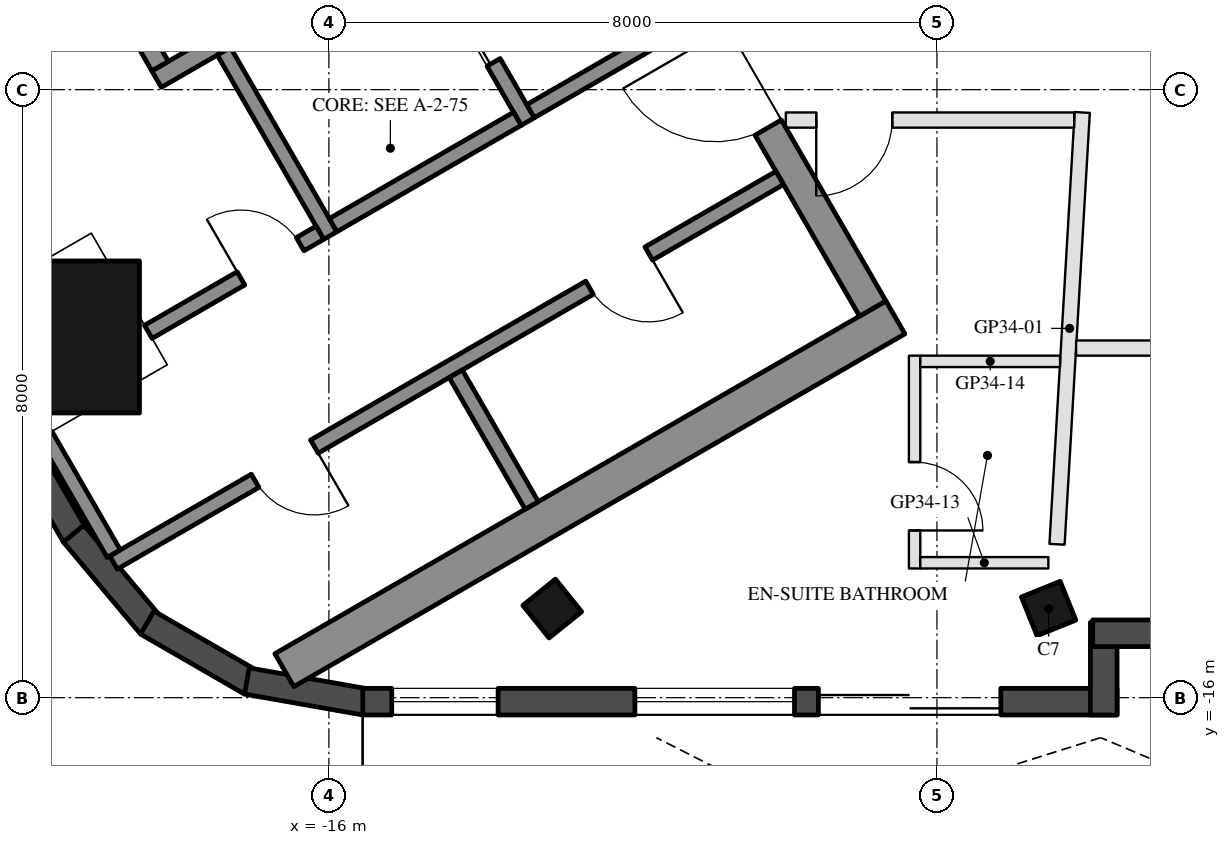
"""IFC4 building model, lengths in metres.
Left out: names, types, materials, properties, quantities, classifications, styles, units other than length and angle.
Written with IfcOpenShell. Run it as: python <this file> out.ifc"""

import sys

from ifc_helpers import new_model, si_unit, direction, frame, frame_2d, origin, origin_2d, place, context, subcontext, project, spatial, rectangle, hollow_rectangle, extrude, boolean, halfspace, element, fill, save


model = new_model("IFC4")
c1 = context("Model", 3, precision=1e-05, world=origin(), true_north=direction((0.0, 1.0)))
c2 = subcontext(c1, "Body", "Model", "MODEL_VIEW")
j1 = project(units=[si_unit("LENGTHUNIT", "METRE"), si_unit("PLANEANGLEUNIT", "RADIAN")], contexts=[c1])
p1 = place(None, origin())
s1 = spatial("IfcSite", under=j1, at=p1, CompositionType="ELEMENT")
p2 = place(p1, origin())
s2 = spatial("IfcBuilding", under=s1, at=p2, CompositionType="ELEMENT")
p3 = place(p2, frame((0.0, 0.0, 320.7)))
s3 = spatial("IfcBuildingStorey", under=s2, at=p3, CompositionType="ELEMENT", Elevation=320.7)
p4 = place(p3, frame((-13.061, -14.827, 0.0), z_axis=(0.121007284992, 0.150336498529, 0.981201393287), x_axis=(-0.992609775631, 0.009249858451, 0.120996997646)))
e1 = element("IfcColumn", 1, at=p4, inside=s3, PredefinedType="COLUMN", context=c2, shape_type="SweptSolid", body=[
    boolean("DIFFERENCE", boolean("DIFFERENCE", extrude(hollow_rectangle(XDim=0.55, YDim=0.55, WallThickness=0.025, at=origin_2d()), origin(), (0.0, 0.0, 1.0), 3.771), halfspace(frame((0.0, 0.0, 0.04), z_axis=(0.0, 0.0, 1.0), x_axis=(1.0, 0.0, 0.0)), True)), halfspace(frame((0.0, 0.0, 3.731), z_axis=(0.0, 0.0, 1.0), x_axis=(1.0, 0.0, 0.0)), False)),
])
p5 = place(p3, frame((-6.531, -14.827, 0.0), z_axis=(0.060871062735, 0.151168564354, 0.986632038235), x_axis=(-0.998135304591, 0.004721094283, 0.0608574153)))
e2 = element("IfcColumn", 2, at=p5, inside=s3, PredefinedType="COLUMN", context=c2, shape_type="SweptSolid", body=[
    boolean("DIFFERENCE", boolean("DIFFERENCE", extrude(hollow_rectangle(XDim=0.55, YDim=0.55, WallThickness=0.025, at=origin_2d()), origin(), (0.0, 0.0, 1.0), 3.75), halfspace(frame((0.0, 0.0, 0.034), z_axis=(0.0, 0.0, 1.0), x_axis=(1.0, 0.0, 0.0)), True)), halfspace(frame((0.0, 0.0, 3.716), z_axis=(0.0, 0.0, 1.0), x_axis=(1.0, 0.0, 0.0)), False)),
])
p6 = place(p3, frame((-19.492, -11.254, 0.0), z_axis=(0.190406849863, 0.109944185114, 0.975529347424), x_axis=(-0.500043453909, 0.866000314205, 0.0)))
e3 = element("IfcColumn", 3, at=p6, inside=s3, PredefinedType="COLUMN", context=c2, shape_type="SweptSolid", body=[
    boolean("DIFFERENCE", boolean("DIFFERENCE", extrude(hollow_rectangle(XDim=2.0, YDim=2.0, WallThickness=0.05, at=origin_2d()), origin(), (0.0, 0.0, 1.0), 3.793), halfspace(frame((0.0, 0.0, 0.113), z_axis=(0.0, 0.0, 1.0), x_axis=(1.0, 0.0, 0.0)), True)), halfspace(frame((0.0, 0.0, 3.679), z_axis=(0.0, 0.0, 1.0), x_axis=(1.0, 0.0, 0.0)), False)),
])
p7 = place(p3, frame((-21.679, -9.816, 0.0), z_axis=(0.0, 0.0, 1.0), x_axis=(0.500023656998, -0.86601174498, 0.0)))
e4 = element("IfcWall", 4, at=p7, inside=s3, PredefinedType="SOLIDWALL", context=c2, shape_type="SweptSolid", body=[
    extrude(rectangle(XDim=4.677, YDim=0.35, at=frame_2d((2.339, 0.0))), origin(), (0.0, 0.0, 1.0), 3.55),
])
for number, where, z_axis, x_axis in (
    (5, (-19.358, -13.842, 0.0), (0.0, 0.0, 1.0), (0.643, -0.766, 0.0)),
    (6, (-18.389, -15.012, 0.0), (0.0, 0.0, 1.0), (0.866, -0.5, 0.0)),
    (7, (-17.079, -15.781, 0.0), (0.0, 0.0, 1.0), (0.985, -0.174, 0.0)),
):
    element("IfcWall", number, at=place(p3, frame(where, z_axis=z_axis, x_axis=x_axis)), inside=s3, PredefinedType="SOLIDWALL", context=c2, shape_type="SweptSolid", body=[
        extrude(rectangle(XDim=1.579, YDim=0.35, at=frame_2d((0.79, 0.0))), origin(), (0.0, 0.0, 1.0), 3.55),
    ])
p8 = place(p3, frame((-15.554, -16.052, 0.0), z_axis=(0.0, 0.0, 1.0), x_axis=(1.0, 0.0, 0.0)))
e8 = element("IfcWall", 8, at=p8, inside=s3, PredefinedType="SOLIDWALL", context=c2, shape_type="SweptSolid", body=[
    extrude(rectangle(XDim=9.924, YDim=0.35, at=frame_2d((4.962, 0.0))), origin(), (0.0, 0.0, 1.0), 3.55),
])
p9 = place(p8, frame((0.381, 0.0, 0.3)))
e9 = element("IfcOpeningElement", 9, at=p9, cuts=e8, PredefinedType="OPENING", context=c2, shape_type="SweptSolid", body=[
    extrude(rectangle(XDim=1.4, YDim=2.65, at=frame_2d((0.7, 1.325))), frame((0.0, 0.185, 0.0), z_axis=(0.0, -1.0, 0.0), x_axis=(1.0, 0.0, 0.0)), (0.0, 0.0, 1.0), 0.37),
])
p10 = place(p8, frame((5.995, 0.0, 0.0)))
e10 = element("IfcOpeningElement", 10, at=p10, cuts=e8, PredefinedType="OPENING", context=c2, shape_type="SweptSolid", body=[
    extrude(rectangle(XDim=2.4, YDim=2.4, at=frame_2d((1.2, 1.2))), frame((0.0, 0.185, 0.0), z_axis=(0.0, -1.0, 0.0), x_axis=(1.0, 0.0, 0.0)), (0.0, 0.0, 1.0), 0.37),
])
p11 = place(p8, frame((3.58, 0.0, 0.3)))
e11 = element("IfcOpeningElement", 11, at=p11, cuts=e8, PredefinedType="OPENING", context=c2, shape_type="SweptSolid", body=[
    extrude(rectangle(XDim=2.1, YDim=2.65, at=frame_2d((1.05, 1.325))), frame((0.0, 0.185, 0.0), z_axis=(0.0, -1.0, 0.0), x_axis=(1.0, 0.0, 0.0)), (0.0, 0.0, 1.0), 0.37),
])
p12 = place(p3, frame((-5.806, -16.228, 0.0), z_axis=(0.0, 0.0, 1.0), x_axis=(0.0, 1.0, 0.0)))
e12 = element("IfcWall", 12, at=p12, inside=s3, PredefinedType="SOLIDWALL", context=c2, shape_type="SweptSolid", body=[
    extrude(rectangle(XDim=1.22, YDim=0.35, at=frame_2d((0.61, 0.0))), origin(), (0.0, 0.0, 1.0), 3.55),
])
p13 = place(p3, frame((-5.951, -15.153, 0.0), z_axis=(0.0, 0.0, 1.0), x_axis=(1.0, 0.0, 0.0)))
e13 = element("IfcWall", 13, at=p13, inside=s3, PredefinedType="SOLIDWALL", context=c2, shape_type="SweptSolid", body=[
    extrude(rectangle(XDim=5.371, YDim=0.35, at=frame_2d((2.685, 0.0))), origin(), (0.0, 0.0, 1.0), 3.55),
])
p14 = place(p13, frame((1.236, 0.0, 0.0)))
e14 = element("IfcOpeningElement", 14, at=p14, cuts=e13, PredefinedType="OPENING", context=c2, shape_type="SweptSolid", body=[
    extrude(rectangle(XDim=1.8, YDim=2.4, at=frame_2d((0.9, 1.2))), frame((0.0, 0.185, 0.0), z_axis=(0.0, -1.0, 0.0), x_axis=(1.0, 0.0, 0.0)), (0.0, 0.0, 1.0), 0.37),
])
p15 = place(p3, frame((-8.547, -10.997, 0.0), z_axis=(0.0, 0.0, 1.0), x_axis=(-0.866025286072, -0.500000203884, 0.0)))
e15 = element("IfcWall", 15, at=p15, inside=s3, PredefinedType="SHEAR", context=c2, shape_type="SweptSolid", body=[
    extrude(rectangle(XDim=9.283, YDim=0.5, at=frame_2d((4.641, 0.0))), origin(), (0.0, 0.0, 1.0), 3.5),
])
p16 = place(p3, frame((-13.845, -2.22, 0.0), z_axis=(0.0, 0.0, 1.0), x_axis=(0.500004234368, -0.866022959057, 0.0)))
e16 = element("IfcWall", 16, at=p16, inside=s3, PredefinedType="SHEAR", context=c2, shape_type="SweptSolid", body=[
    extrude(rectangle(XDim=10.0, YDim=0.4, at=frame_2d((5.0, 0.0))), origin(), (0.0, 0.0, 1.0), 3.5),
])
p17 = place(p16, frame((3.55, 0.0, 0.0)))
e17 = element("IfcOpeningElement", 17, at=p17, cuts=e16, PredefinedType="OPENING", context=c2, shape_type="SweptSolid", body=[
    extrude(rectangle(XDim=1.1, YDim=2.1, at=frame_2d((0.55, 1.05))), frame((0.0, 0.21, 0.0), z_axis=(0.0, -1.0, 0.0), x_axis=(1.0, 0.0, 0.0)), (0.0, 0.0, 1.0), 0.42),
])
p18 = place(p16, frame((5.85, 0.0, 0.0)))
e18 = element("IfcOpeningElement", 18, at=p18, cuts=e16, PredefinedType="OPENING", context=c2, shape_type="SweptSolid", body=[
    extrude(rectangle(XDim=1.4, YDim=2.1, at=frame_2d((0.7, 1.05))), frame((0.0, 0.21, 0.0), z_axis=(0.0, -1.0, 0.0), x_axis=(1.0, 0.0, 0.0)), (0.0, 0.0, 1.0), 0.42),
])
p19 = place(p3, frame((-12.681, -4.636, 0.0), z_axis=(0.0, 0.0, 1.0), x_axis=(-0.866021702275, -0.500006411147, 0.0)))
e19 = element("IfcWall", 19, at=p19, inside=s3, PredefinedType="SHEAR", context=c2, shape_type="SweptSolid", body=[
    extrude(rectangle(XDim=6.45, YDim=0.25, at=frame_2d((3.225, 0.0))), origin(), (0.0, 0.0, 1.0), 3.5),
])
p20 = place(p19, frame((0.3, 0.0, 0.0)))
e20 = element("IfcOpeningElement", 20, at=p20, cuts=e19, PredefinedType="OPENING", context=c2, shape_type="SweptSolid", body=[
    extrude(rectangle(XDim=1.0, YDim=2.1, at=frame_2d((0.5, 1.05))), frame((0.0, 0.135, 0.0), z_axis=(0.0, -1.0, 0.0), x_axis=(1.0, 0.0, 0.0)), (0.0, 0.0, 1.0), 0.27),
])
p21 = place(p3, frame((-19.496, -5.482, 0.0), z_axis=(0.0, 0.0, 1.0), x_axis=(0.499990435942, -0.866030925526, 0.0)))
e21 = element("IfcWall", 21, at=p21, inside=s3, PredefinedType="SHEAR", context=c2, shape_type="SweptSolid", body=[
    extrude(rectangle(XDim=2.55, YDim=0.25, at=frame_2d((1.275, 0.0))), origin(), (0.0, 0.0, 1.0), 3.5),
])
p22 = place(p3, frame((-17.381, -7.495, 0.0), z_axis=(0.0, 0.0, 1.0), x_axis=(0.500011755427, -0.866018616679, 0.0)))
e22 = element("IfcWall", 22, at=p22, inside=s3, PredefinedType="SHEAR", context=c2, shape_type="SweptSolid", body=[
    extrude(rectangle(XDim=2.8, YDim=0.2, at=frame_2d((1.4, 0.0))), origin(), (0.0, 0.0, 1.0), 3.5),
])
p23 = place(p3, frame((-14.783, -5.995, 0.0), z_axis=(0.0, 0.0, 1.0), x_axis=(0.49994636267, -0.866056369097, 0.0)))
e23 = element("IfcWall", 23, at=p23, inside=s3, PredefinedType="SHEAR", context=c2, shape_type="SweptSolid", body=[
    extrude(rectangle(XDim=2.8, YDim=0.2, at=frame_2d((1.4, 0.0))), origin(), (0.0, 0.0, 1.0), 3.5),
])
p24 = place(p23, frame((0.7, 0.0, 0.0)))
e24 = element("IfcOpeningElement", 24, at=p24, cuts=e23, PredefinedType="OPENING", context=c2, shape_type="SweptSolid", body=[
    extrude(rectangle(XDim=1.2, YDim=2.1, at=frame_2d((0.6, 1.05))), frame((0.0, 0.11, 0.0), z_axis=(0.0, -1.0, 0.0), x_axis=(1.0, 0.0, 0.0)), (0.0, 0.0, 1.0), 0.22),
])
p25 = place(p3, frame((-13.52, -8.383, 0.0), z_axis=(0.0, 0.0, 1.0), x_axis=(-0.866034573852, -0.49998411664, 0.0)))
e25 = element("IfcWall", 25, at=p25, inside=s3, PredefinedType="SHEAR", context=c2, shape_type="SweptSolid", body=[
    extrude(rectangle(XDim=2.8, YDim=0.2, at=frame_2d((1.4, 0.0))), origin(), (0.0, 0.0, 1.0), 3.5),
])
p26 = place(p3, frame((-11.268, -7.083, 0.0), z_axis=(0.0, 0.0, 1.0), x_axis=(-0.866050077142, -0.499957262057, 0.0)))
e26 = element("IfcWall", 26, at=p26, inside=s3, PredefinedType="SHEAR", context=c2, shape_type="SweptSolid", body=[
    extrude(rectangle(XDim=2.4, YDim=0.2, at=frame_2d((1.2, 0.0))), origin(), (0.0, 0.0, 1.0), 3.5),
])
p27 = place(p3, frame((-10.068, -9.162, 0.0), z_axis=(0.0, 0.0, 1.0), x_axis=(-0.866030125237, -0.499991822116, 0.0)))
e27 = element("IfcWall", 27, at=p27, inside=s3, PredefinedType="SHEAR", context=c2, shape_type="SweptSolid", body=[
    extrude(rectangle(XDim=10.121, YDim=0.2, at=frame_2d((5.061, 0.0))), origin(), (0.0, 0.0, 1.0), 3.5),
])
p28 = place(p27, frame((1.99, 0.0, 0.0)))
e28 = element("IfcOpeningElement", 28, at=p28, cuts=e27, PredefinedType="OPENING", context=c2, shape_type="SweptSolid", body=[
    extrude(rectangle(XDim=0.9, YDim=2.1, at=frame_2d((0.45, 1.05))), frame((0.0, 0.11, 0.0), z_axis=(0.0, -1.0, 0.0), x_axis=(1.0, 0.0, 0.0)), (0.0, 0.0, 1.0), 0.22),
])
p29 = place(p27, frame((7.07, 0.0, 0.0)))
e29 = element("IfcOpeningElement", 29, at=p29, cuts=e27, PredefinedType="OPENING", context=c2, shape_type="SweptSolid", body=[
    extrude(rectangle(XDim=0.9, YDim=2.1, at=frame_2d((0.45, 1.05))), frame((0.0, 0.11, 0.0), z_axis=(0.0, -1.0, 0.0), x_axis=(1.0, 0.0, 0.0)), (0.0, 0.0, 1.0), 0.22),
])
p30 = place(p3, frame((-19.73, -12.546, 0.0), z_axis=(0.0, 0.0, 1.0), x_axis=(0.500004188491, -0.866022985545, 0.0)))
e30 = element("IfcWall", 30, at=p30, inside=s3, PredefinedType="SHEAR", context=c2, shape_type="SweptSolid", body=[
    extrude(rectangle(XDim=1.8, YDim=0.2, at=frame_2d((0.9, 0.0))), origin(), (0.0, 0.0, 1.0), 3.5),
])
p31 = place(p3, frame((-16.118, -9.883, 0.0), z_axis=(0.0, 0.0, 1.0), x_axis=(-0.866045268016, -0.499965592563, 0.0)))
e31 = element("IfcWall", 31, at=p31, inside=s3, PredefinedType="SHEAR", context=c2, shape_type="SweptSolid", body=[
    extrude(rectangle(XDim=2.608, YDim=0.2, at=frame_2d((1.304, 0.0))), origin(), (0.0, 0.0, 1.0), 3.5),
])
p32 = place(p31, frame((0.3, 0.0, 0.0)))
e32 = element("IfcOpeningElement", 32, at=p32, cuts=e31, PredefinedType="OPENING", context=c2, shape_type="SweptSolid", body=[
    extrude(rectangle(XDim=0.9, YDim=2.1, at=frame_2d((0.45, 1.05))), frame((0.0, 0.11, 0.0), z_axis=(0.0, -1.0, 0.0), x_axis=(1.0, 0.0, 0.0)), (0.0, 0.0, 1.0), 0.22),
])
p33 = place(p3, frame((-14.331, -11.738, 0.0), z_axis=(0.0, 0.0, 1.0), x_axis=(0.499972520799, -0.866041268327, 0.0)))
e33 = element("IfcWall", 33, at=p33, inside=s3, PredefinedType="SHEAR", context=c2, shape_type="SweptSolid", body=[
    extrude(rectangle(XDim=2.0, YDim=0.2, at=frame_2d((1.0, 0.0))), origin(), (0.0, 0.0, 1.0), 3.5),
])
p34 = place(p3, frame((-6.42, -13.982, 0.0), z_axis=(0.0, 0.0, 1.0), x_axis=(0.058254288977, 0.998301776927, 0.0)))
e34 = element("IfcWall", 34, at=p34, inside=s3, PredefinedType="PARTITIONING", context=c2, shape_type="SweptSolid", body=[
    extrude(rectangle(XDim=5.691, YDim=0.2, at=frame_2d((2.846, 0.0))), origin(), (0.0, 0.0, 1.0), 3.15),
])
p35 = place(p3, frame((-6.194, -8.4, 0.0), z_axis=(0.0, 0.0, 1.0), x_axis=(-1.0, 0.0, 0.0)))
e35 = element("IfcWall", 35, at=p35, inside=s3, PredefinedType="PARTITIONING", context=c2, shape_type="SweptSolid", body=[
    extrude(rectangle(XDim=3.794, YDim=0.2, at=frame_2d((1.897, 0.0))), origin(), (0.0, 0.0, 1.0), 3.15),
])
p36 = place(p35, frame((2.394, 0.0, 0.0)))
e36 = element("IfcOpeningElement", 36, at=p36, cuts=e35, PredefinedType="OPENING", context=c2, shape_type="SweptSolid", body=[
    extrude(rectangle(XDim=1.0, YDim=2.1, at=frame_2d((0.5, 1.05))), frame((0.0, 0.11, 0.0), z_axis=(0.0, -1.0, 0.0), x_axis=(1.0, 0.0, 0.0)), (0.0, 0.0, 1.0), 0.22),
])
p37 = place(p3, frame((-8.294, -11.5, 0.0), z_axis=(0.0, 0.0, 1.0), x_axis=(0.0, -1.0, 0.0)))
e37 = element("IfcWall", 37, at=p37, inside=s3, PredefinedType="PARTITIONING", context=c2, shape_type="SweptSolid", body=[
    extrude(rectangle(XDim=2.8, YDim=0.15, at=frame_2d((1.4, 0.0))), origin(), (0.0, 0.0, 1.0), 3.1),
])
p38 = place(p37, frame((1.4, 0.0, 0.0)))
e38 = element("IfcOpeningElement", 38, at=p38, cuts=e37, PredefinedType="OPENING", context=c2, shape_type="SweptSolid", body=[
    extrude(rectangle(XDim=0.9, YDim=2.1, at=frame_2d((0.45, 1.05))), frame((0.0, 0.085, 0.0), z_axis=(0.0, -1.0, 0.0), x_axis=(1.0, 0.0, 0.0)), (0.0, 0.0, 1.0), 0.17),
])
p39 = place(p3, frame((-8.219, -14.225, 0.0), z_axis=(0.0, 0.0, 1.0), x_axis=(1.0, 0.0, 0.0)))
e39 = element("IfcWall", 39, at=p39, inside=s3, PredefinedType="PARTITIONING", context=c2, shape_type="SweptSolid", body=[
    extrude(rectangle(XDim=1.685, YDim=0.15, at=frame_2d((0.842, 0.0))), origin(), (0.0, 0.0, 1.0), 3.1),
])
p40 = place(p3, frame((-8.219, -11.575, 0.0), z_axis=(0.0, 0.0, 1.0), x_axis=(1.0, 0.0, 0.0)))
e40 = element("IfcWall", 40, at=p40, inside=s3, PredefinedType="PARTITIONING", context=c2, shape_type="SweptSolid", body=[
    extrude(rectangle(XDim=1.839, YDim=0.15, at=frame_2d((0.92, 0.0))), origin(), (0.0, 0.0, 1.0), 3.15),
])
p41 = place(p3, frame((-2.1, -11.4, 0.0), z_axis=(0.0, 0.0, 1.0), x_axis=(-1.0, 0.0, 0.0)))
e41 = element("IfcWall", 41, at=p41, inside=s3, PredefinedType="PARTITIONING", context=c2, shape_type="SweptSolid", body=[
    extrude(rectangle(XDim=4.069, YDim=0.2, at=frame_2d((2.035, 0.0))), origin(), (0.0, 0.0, 1.0), 3.15),
])
p42 = place(p41, frame((1.535, 0.0, 0.0)))
e42 = element("IfcOpeningElement", 42, at=p42, cuts=e41, PredefinedType="OPENING", context=c2, shape_type="SweptSolid", body=[
    extrude(rectangle(XDim=1.0, YDim=2.1, at=frame_2d((0.5, 1.05))), frame((0.0, 0.11, 0.0), z_axis=(0.0, -1.0, 0.0), x_axis=(1.0, 0.0, 0.0)), (0.0, 0.0, 1.0), 0.22),
])
p43 = place(p9, origin())
e43 = element("IfcWindow", 43, at=p43, inside=s3, PartitioningType="SINGLE_PANEL", PredefinedType="WINDOW", context=c2, shape_type="SweptSolid", body=[
    extrude(rectangle(XDim=1.4, YDim=2.65, at=frame_2d((0.7, 1.325))), frame((0.0, 0.03, 0.0), z_axis=(0.0, -1.0, 0.0), x_axis=(1.0, 0.0, 0.0)), (0.0, 0.0, 1.0), 0.06),
])
fill(e9, e43)
p44 = place(p10, frame((2.4, 0.0, 0.0), z_axis=(0.0, 0.0, 1.0), x_axis=(-1.0, 0.0, 0.0)))
e44 = element("IfcDoor", 44, at=p44, inside=s3, OperationType="SLIDING_TO_LEFT", PredefinedType="DOOR", context=c2, shape_type="SweptSolid", body=[
    extrude(rectangle(XDim=2.4, YDim=2.4, at=frame_2d((1.2, 1.2))), frame((0.0, 0.025, 0.0), z_axis=(0.0, -1.0, 0.0), x_axis=(1.0, 0.0, 0.0)), (0.0, 0.0, 1.0), 0.05),
])
fill(e10, e44)
p45 = place(p11, origin())
e45 = element("IfcWindow", 45, at=p45, inside=s3, PartitioningType="SINGLE_PANEL", PredefinedType="WINDOW", context=c2, shape_type="SweptSolid", body=[
    extrude(rectangle(XDim=2.1, YDim=2.65, at=frame_2d((1.05, 1.325))), frame((0.0, 0.03, 0.0), z_axis=(0.0, -1.0, 0.0), x_axis=(1.0, 0.0, 0.0)), (0.0, 0.0, 1.0), 0.06),
])
fill(e11, e45)
p46 = place(p24, origin())
e46 = element("IfcDoor", 46, at=p46, inside=s3, OperationType="DOUBLE_DOOR_SLIDING", PredefinedType="DOOR", context=c2, shape_type="SweptSolid", body=[
    extrude(rectangle(XDim=1.2, YDim=2.1, at=frame_2d((0.6, 1.05))), frame((0.0, 0.025, 0.0), z_axis=(0.0, -1.0, 0.0), x_axis=(1.0, 0.0, 0.0)), (0.0, 0.0, 1.0), 0.05),
])
fill(e24, e46)
p47 = place(p28, origin())
e47 = element("IfcDoor", 47, at=p47, inside=s3, OperationType="SINGLE_SWING_LEFT", PredefinedType="DOOR", context=c2, shape_type="SweptSolid", body=[
    extrude(rectangle(XDim=0.9, YDim=2.1, at=frame_2d((0.45, 1.05))), frame((0.0, 0.025, 0.0), z_axis=(0.0, -1.0, 0.0), x_axis=(1.0, 0.0, 0.0)), (0.0, 0.0, 1.0), 0.05),
])
fill(e28, e47)
p48 = place(p29, origin())
e48 = element("IfcDoor", 48, at=p48, inside=s3, OperationType="SINGLE_SWING_LEFT", PredefinedType="DOOR", context=c2, shape_type="SweptSolid", body=[
    extrude(rectangle(XDim=0.9, YDim=2.1, at=frame_2d((0.45, 1.05))), frame((0.0, 0.025, 0.0), z_axis=(0.0, -1.0, 0.0), x_axis=(1.0, 0.0, 0.0)), (0.0, 0.0, 1.0), 0.05),
])
fill(e29, e48)
p49 = place(p32, frame((0.9, 0.0, 0.0), z_axis=(0.0, 0.0, 1.0), x_axis=(-1.0, 0.0, 0.0)))
e49 = element("IfcDoor", 49, at=p49, inside=s3, OperationType="SINGLE_SWING_LEFT", PredefinedType="DOOR", context=c2, shape_type="SweptSolid", body=[
    extrude(rectangle(XDim=0.9, YDim=2.1, at=frame_2d((0.45, 1.05))), frame((0.0, 0.025, 0.0), z_axis=(0.0, -1.0, 0.0), x_axis=(1.0, 0.0, 0.0)), (0.0, 0.0, 1.0), 0.05),
])
fill(e32, e49)
p50 = place(p18, frame((1.4, 0.0, 0.0), z_axis=(0.0, 0.0, 1.0), x_axis=(-1.0, 0.0, 0.0)))
e50 = element("IfcDoor", 50, at=p50, inside=s3, OperationType="DOUBLE_DOOR_SINGLE_SWING", PredefinedType="DOOR", context=c2, shape_type="SweptSolid", body=[
    extrude(rectangle(XDim=1.4, YDim=2.1, at=frame_2d((0.7, 1.05))), frame((0.0, 0.025, 0.0), z_axis=(0.0, -1.0, 0.0), x_axis=(1.0, 0.0, 0.0)), (0.0, 0.0, 1.0), 0.05),
])
fill(e18, e50)
p51 = place(p38, origin())
e51 = element("IfcDoor", 51, at=p51, inside=s3, OperationType="SINGLE_SWING_RIGHT", PredefinedType="DOOR", context=c2, shape_type="SweptSolid", body=[
    extrude(rectangle(XDim=0.9, YDim=2.1, at=frame_2d((0.45, 1.05))), frame((0.0, 0.025, 0.0), z_axis=(0.0, -1.0, 0.0), x_axis=(1.0, 0.0, 0.0)), (0.0, 0.0, 1.0), 0.05),
])
fill(e38, e51)
p52 = place(p36, origin())
e52 = element("IfcDoor", 52, at=p52, inside=s3, OperationType="SINGLE_SWING_RIGHT", PredefinedType="DOOR", context=c2, shape_type="SweptSolid", body=[
    extrude(rectangle(XDim=1.0, YDim=2.1, at=frame_2d((0.5, 1.05))), frame((0.0, 0.025, 0.0), z_axis=(0.0, -1.0, 0.0), x_axis=(1.0, 0.0, 0.0)), (0.0, 0.0, 1.0), 0.05),
])
fill(e36, e52)
save(model, sys.argv[1])
